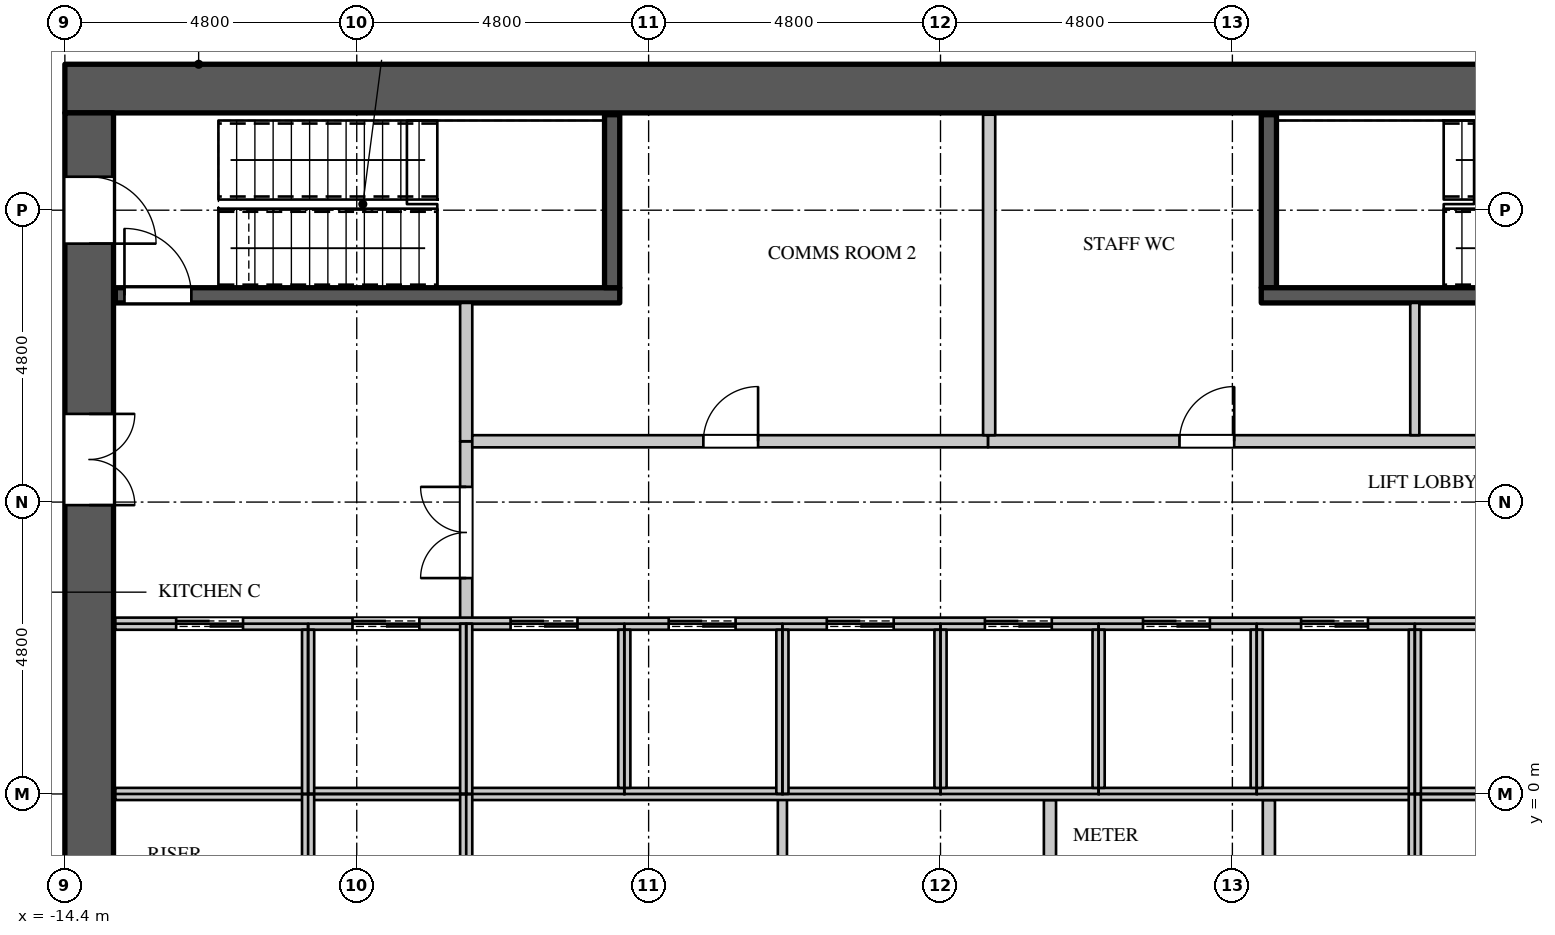
"""IFC4 building model, lengths in metres.
Left out: names, types, materials, properties, quantities, classifications, styles, units other than length and angle.
Written with IfcOpenShell. Run it as: python <this file> out.ifc"""

import sys

from ifc_helpers import new_model, si_unit, direction, frame, frame_2d, origin, place, context, subcontext, project, spatial, rectangle, extrude, element, fill, save


model = new_model("IFC4")
c1 = context("Model", 3, precision=1e-05, world=origin(), true_north=direction((0.0, 1.0)))
c2 = subcontext(c1, "Body", "Model", "MODEL_VIEW")
j1 = project(units=[si_unit("LENGTHUNIT", "METRE"), si_unit("PLANEANGLEUNIT", "RADIAN")], contexts=[c1])
p1 = place(None, origin())
s1 = spatial("IfcSite", under=j1, at=p1, CompositionType="ELEMENT")
p2 = place(p1, origin())
s2 = spatial("IfcBuilding", under=s1, at=p2, CompositionType="ELEMENT")
p3 = place(p2, frame((0.0, 0.0, 148.5)))
s3 = spatial("IfcBuildingStorey", under=s2, at=p3, CompositionType="ELEMENT", Elevation=148.5)
p4 = place(p3, frame((-14.4, 11.6, 0.0), z_axis=(0.0, 0.0, 1.0), x_axis=(1.0, 0.0, 0.0)))
e1 = element("IfcWall", 1, at=p4, inside=s3, PredefinedType="SHEAR", context=c2, shape_type="SweptSolid", body=[
    extrude(rectangle(XDim=28.8, YDim=0.8, at=frame_2d((14.4, 0.0))), origin(), (0.0, 0.0, 1.0), 4.2),
])
p5 = place(p3, frame((-14.0, -11.2, 0.0), z_axis=(0.0, 0.0, 1.0), x_axis=(0.0, 1.0, 0.0)))
e2 = element("IfcWall", 2, at=p5, inside=s3, PredefinedType="SHEAR", context=c2, shape_type="SweptSolid", body=[
    extrude(rectangle(XDim=22.4, YDim=0.8, at=frame_2d((11.2, 0.0))), origin(), (0.0, 0.0, 1.0), 4.2),
])
p6 = place(p5, frame((20.25, 0.0, 0.0)))
e3 = element("IfcOpeningElement", 3, at=p6, cuts=e2, PredefinedType="OPENING", context=c2, shape_type="SweptSolid", body=[
    extrude(rectangle(XDim=1.1, YDim=2.2, at=frame_2d((0.55, 1.1))), frame((0.0, 0.41, 0.0), z_axis=(0.0, -1.0, 0.0), x_axis=(1.0, 0.0, 0.0)), (0.0, 0.0, 1.0), 0.82),
])
p7 = place(p5, frame((1.05, 0.0, 0.0)))
e4 = element("IfcOpeningElement", 4, at=p7, cuts=e2, PredefinedType="OPENING", context=c2, shape_type="SweptSolid", body=[
    extrude(rectangle(XDim=1.1, YDim=2.2, at=frame_2d((0.55, 1.1))), frame((0.0, 0.41, 0.0), z_axis=(0.0, -1.0, 0.0), x_axis=(1.0, 0.0, 0.0)), (0.0, 0.0, 1.0), 0.82),
])
p8 = place(p5, frame((15.95, 0.0, 0.0)))
e5 = element("IfcOpeningElement", 5, at=p8, cuts=e2, PredefinedType="OPENING", context=c2, shape_type="SweptSolid", body=[
    extrude(rectangle(XDim=1.5, YDim=2.4, at=frame_2d((0.75, 1.2))), frame((0.0, 0.41, 0.0), z_axis=(0.0, -1.0, 0.0), x_axis=(1.0, 0.0, 0.0)), (0.0, 0.0, 1.0), 0.82),
])
p9 = place(p5, frame((4.95, 0.0, 0.0)))
e6 = element("IfcOpeningElement", 6, at=p9, cuts=e2, PredefinedType="OPENING", context=c2, shape_type="SweptSolid", body=[
    extrude(rectangle(XDim=1.5, YDim=2.4, at=frame_2d((0.75, 1.2))), frame((0.0, 0.41, 0.0), z_axis=(0.0, -1.0, 0.0), x_axis=(1.0, 0.0, 0.0)), (0.0, 0.0, 1.0), 0.82),
])
p10 = place(p3, frame((-7.8, 2.8, 0.0), z_axis=(0.0, 0.0, 1.0), x_axis=(0.0, 1.0, 0.0)))
e7 = element("IfcWall", 7, at=p10, inside=s3, PredefinedType="PARTITIONING", context=c2, shape_type="SweptSolid", body=[
    extrude(rectangle(XDim=3.0, YDim=0.2, at=frame_2d((1.5, 0.0))), origin(), (0.0, 0.0, 1.0), 3.798),
])
p11 = place(p10, frame((0.75, 0.0, 0.0)))
e8 = element("IfcOpeningElement", 8, at=p11, cuts=e7, PredefinedType="OPENING", context=c2, shape_type="SweptSolid", body=[
    extrude(rectangle(XDim=1.5, YDim=2.4, at=frame_2d((0.75, 1.2))), frame((0.0, 0.11, 0.0), z_axis=(0.0, -1.0, 0.0), x_axis=(1.0, 0.0, 0.0)), (0.0, 0.0, 1.0), 0.22),
])
p12 = place(p3, frame((0.78, 5.8, 0.0), z_axis=(0.0, 0.0, 1.0), x_axis=(1.0, 0.0, 0.0)))
e9 = element("IfcWall", 9, at=p12, inside=s3, PredefinedType="PARTITIONING", context=c2, shape_type="SweptSolid", body=[
    extrude(rectangle(XDim=12.79, YDim=0.2, at=frame_2d((6.395, 0.0))), origin(), (0.0, 0.0, 1.0), 3.798),
])
p13 = place(p12, frame((3.15, 0.0, 0.0)))
e10 = element("IfcOpeningElement", 10, at=p13, cuts=e9, PredefinedType="OPENING", context=c2, shape_type="SweptSolid", body=[
    extrude(rectangle(XDim=0.9, YDim=2.2, at=frame_2d((0.45, 1.1))), frame((0.0, 0.11, 0.0), z_axis=(0.0, -1.0, 0.0), x_axis=(1.0, 0.0, 0.0)), (0.0, 0.0, 1.0), 0.22),
])
p14 = place(p12, frame((9.35, 0.0, 0.0)))
e11 = element("IfcOpeningElement", 11, at=p14, cuts=e9, PredefinedType="OPENING", context=c2, shape_type="SweptSolid", body=[
    extrude(rectangle(XDim=0.9, YDim=2.2, at=frame_2d((0.45, 1.1))), frame((0.0, 0.11, 0.0), z_axis=(0.0, -1.0, 0.0), x_axis=(1.0, 0.0, 0.0)), (0.0, 0.0, 1.0), 0.22),
])
p15 = place(p3, frame((-2.6, -2.7, 0.0), z_axis=(0.0, 0.0, 1.0), x_axis=(0.0, 1.0, 0.0)))
e12 = element("IfcWall", 12, at=p15, inside=s3, PredefinedType="PARTITIONING", context=c2, shape_type="SweptSolid", body=[
    extrude(rectangle(XDim=2.7, YDim=0.15, at=frame_2d((1.35, 0.0))), origin(), (0.0, 0.0, 1.0), 3.798),
])
p16 = place(p3, frame((7.8, 5.9, 0.0), z_axis=(0.0, 0.0, 1.0), x_axis=(0.0, 1.0, 0.0)))
e13 = element("IfcWall", 13, at=p16, inside=s3, PredefinedType="PARTITIONING", context=c2, shape_type="SweptSolid", body=[
    extrude(rectangle(XDim=2.175, YDim=0.15, at=frame_2d((1.087, 0.0))), origin(), (0.0, 0.0, 1.0), 3.798),
])
p17 = place(p3, frame((-7.8, 5.8, 0.0), z_axis=(0.0, 0.0, 1.0), x_axis=(0.0, 1.0, 0.0)))
e14 = element("IfcWall", 14, at=p17, inside=s3, PredefinedType="PARTITIONING", context=c2, shape_type="SweptSolid", body=[
    extrude(rectangle(XDim=2.275, YDim=0.2, at=frame_2d((1.137, 0.0))), origin(), (0.0, 0.0, 1.0), 3.798),
])
p18 = place(p3, frame((-7.7, 5.8, 0.0), z_axis=(0.0, 0.0, 1.0), x_axis=(1.0, 0.0, 0.0)))
e15 = element("IfcWall", 15, at=p18, inside=s3, PredefinedType="PARTITIONING", context=c2, shape_type="SweptSolid", body=[
    extrude(rectangle(XDim=8.48, YDim=0.2, at=frame_2d((4.24, 0.0))), origin(), (0.0, 0.0, 1.0), 3.798),
])
p19 = place(p18, frame((3.8, 0.0, 0.0)))
e16 = element("IfcOpeningElement", 16, at=p19, cuts=e15, PredefinedType="OPENING", context=c2, shape_type="SweptSolid", body=[
    extrude(rectangle(XDim=0.9, YDim=2.2, at=frame_2d((0.45, 1.1))), frame((0.0, 0.11, 0.0), z_axis=(0.0, -1.0, 0.0), x_axis=(1.0, 0.0, 0.0)), (0.0, 0.0, 1.0), 0.22),
])
p20 = place(p3, frame((0.8, 5.9, 0.0), z_axis=(0.0, 0.0, 1.0), x_axis=(0.0, 1.0, 0.0)))
e17 = element("IfcWall", 17, at=p20, inside=s3, PredefinedType="PARTITIONING", context=c2, shape_type="SweptSolid", body=[
    extrude(rectangle(XDim=5.27, YDim=0.2, at=frame_2d((2.635, 0.0))), origin(), (0.0, 0.0, 1.0), 3.798),
])
for number, where, z_axis, x_axis in (
    (18, (1.8, -2.7, 0.0), (0.0, 0.0, 1.0), (0.0, 1.0, 0.0)),
    (19, (5.4, -2.7, 0.0), (0.0, 0.0, 1.0), (0.0, 1.0, 0.0)),
):
    element("IfcWall", number, at=place(p3, frame(where, z_axis=z_axis, x_axis=x_axis)), inside=s3, PredefinedType="PARTITIONING", context=c2, shape_type="SweptSolid", body=[
        extrude(rectangle(XDim=2.6, YDim=0.2, at=frame_2d((1.3, 0.0))), origin(), (0.0, 0.0, 1.0), 3.798),
    ])
p21 = place(p3, frame((-13.57, 0.0, 0.0), z_axis=(0.0, 0.0, 1.0), x_axis=(1.0, 0.0, 0.0)))
e20 = element("IfcWall", 20, at=p21, inside=s3, PredefinedType="PARTITIONING", context=c2, shape_type="SweptSolid", body=[
    extrude(rectangle(XDim=23.97, YDim=0.2, at=frame_2d((11.985, 0.0))), origin(), (0.0, 0.0, 1.0), 3.798),
])
p22 = place(p3, frame((-13.57, 2.8, 0.0), z_axis=(0.0, 0.0, 1.0), x_axis=(1.0, 0.0, 0.0)))
e21 = element("IfcWall", 21, at=p22, inside=s3, PredefinedType="PARTITIONING", context=c2, shape_type="SweptSolid", body=[
    extrude(rectangle(XDim=23.97, YDim=0.2, at=frame_2d((11.985, 0.0))), origin(), (0.0, 0.0, 1.0), 3.798),
])
p23 = place(p22, frame((1.0, 0.0, 0.0)))
e22 = element("IfcOpeningElement", 22, at=p23, cuts=e21, PredefinedType="OPENING", context=c2, shape_type="SweptSolid", body=[
    extrude(rectangle(XDim=1.1, YDim=2.2, at=frame_2d((0.55, 1.1))), frame((0.0, 0.11, 0.0), z_axis=(0.0, -1.0, 0.0), x_axis=(1.0, 0.0, 0.0)), (0.0, 0.0, 1.0), 0.22),
])
p24 = place(p22, frame((3.9, 0.0, 0.0)))
e23 = element("IfcOpeningElement", 23, at=p24, cuts=e21, PredefinedType="OPENING", context=c2, shape_type="SweptSolid", body=[
    extrude(rectangle(XDim=1.1, YDim=2.2, at=frame_2d((0.55, 1.1))), frame((0.0, 0.11, 0.0), z_axis=(0.0, -1.0, 0.0), x_axis=(1.0, 0.0, 0.0)), (0.0, 0.0, 1.0), 0.22),
])
p25 = place(p22, frame((6.5, 0.0, 0.0)))
e24 = element("IfcOpeningElement", 24, at=p25, cuts=e21, PredefinedType="OPENING", context=c2, shape_type="SweptSolid", body=[
    extrude(rectangle(XDim=1.1, YDim=2.2, at=frame_2d((0.55, 1.1))), frame((0.0, 0.11, 0.0), z_axis=(0.0, -1.0, 0.0), x_axis=(1.0, 0.0, 0.0)), (0.0, 0.0, 1.0), 0.22),
])
p26 = place(p22, frame((9.1, 0.0, 0.0)))
e25 = element("IfcOpeningElement", 25, at=p26, cuts=e21, PredefinedType="OPENING", context=c2, shape_type="SweptSolid", body=[
    extrude(rectangle(XDim=1.1, YDim=2.2, at=frame_2d((0.55, 1.1))), frame((0.0, 0.11, 0.0), z_axis=(0.0, -1.0, 0.0), x_axis=(1.0, 0.0, 0.0)), (0.0, 0.0, 1.0), 0.22),
])
p27 = place(p22, frame((11.7, 0.0, 0.0)))
e26 = element("IfcOpeningElement", 26, at=p27, cuts=e21, PredefinedType="OPENING", context=c2, shape_type="SweptSolid", body=[
    extrude(rectangle(XDim=1.1, YDim=2.2, at=frame_2d((0.55, 1.1))), frame((0.0, 0.11, 0.0), z_axis=(0.0, -1.0, 0.0), x_axis=(1.0, 0.0, 0.0)), (0.0, 0.0, 1.0), 0.22),
])
p28 = place(p22, frame((14.3, 0.0, 0.0)))
e27 = element("IfcOpeningElement", 27, at=p28, cuts=e21, PredefinedType="OPENING", context=c2, shape_type="SweptSolid", body=[
    extrude(rectangle(XDim=1.1, YDim=2.2, at=frame_2d((0.55, 1.1))), frame((0.0, 0.11, 0.0), z_axis=(0.0, -1.0, 0.0), x_axis=(1.0, 0.0, 0.0)), (0.0, 0.0, 1.0), 0.22),
])
p29 = place(p22, frame((16.9, 0.0, 0.0)))
e28 = element("IfcOpeningElement", 28, at=p29, cuts=e21, PredefinedType="OPENING", context=c2, shape_type="SweptSolid", body=[
    extrude(rectangle(XDim=1.1, YDim=2.2, at=frame_2d((0.55, 1.1))), frame((0.0, 0.11, 0.0), z_axis=(0.0, -1.0, 0.0), x_axis=(1.0, 0.0, 0.0)), (0.0, 0.0, 1.0), 0.22),
])
p30 = place(p22, frame((19.5, 0.0, 0.0)))
e29 = element("IfcOpeningElement", 29, at=p30, cuts=e21, PredefinedType="OPENING", context=c2, shape_type="SweptSolid", body=[
    extrude(rectangle(XDim=1.1, YDim=2.2, at=frame_2d((0.55, 1.1))), frame((0.0, 0.11, 0.0), z_axis=(0.0, -1.0, 0.0), x_axis=(1.0, 0.0, 0.0)), (0.0, 0.0, 1.0), 0.22),
])
for number, where, z_axis, x_axis in (
    (30, (-10.4, -2.7, 0.0), (0.0, 0.0, 1.0), (0.0, 1.0, 0.0)),
    (31, (-10.4, 0.0, 0.0), (0.0, 0.0, 1.0), (0.0, 1.0, 0.0)),
):
    element("IfcWall", number, at=place(p3, frame(where, z_axis=z_axis, x_axis=x_axis)), inside=s3, PredefinedType="PARTITIONING", context=c2, shape_type="SweptSolid", body=[
        extrude(rectangle(XDim=2.7, YDim=0.2, at=frame_2d((1.35, 0.0))), origin(), (0.0, 0.0, 1.0), 3.798),
    ])
for number, where, z_axis, x_axis in (
    (32, (-7.8, -2.8, 0.0), (0.0, 0.0, 1.0), (0.0, 1.0, 0.0)),
    (33, (-7.8, 0.0, 0.0), (0.0, 0.0, 1.0), (0.0, 1.0, 0.0)),
):
    element("IfcWall", number, at=place(p3, frame(where, z_axis=z_axis, x_axis=x_axis)), inside=s3, PredefinedType="PARTITIONING", context=c2, shape_type="SweptSolid", body=[
        extrude(rectangle(XDim=2.8, YDim=0.2, at=frame_2d((1.4, 0.0))), origin(), (0.0, 0.0, 1.0), 3.798),
    ])
p31 = place(p3, frame((-5.2, 0.1, 0.0), z_axis=(0.0, 0.0, 1.0), x_axis=(0.0, 1.0, 0.0)))
e34 = element("IfcWall", 34, at=p31, inside=s3, PredefinedType="PARTITIONING", context=c2, shape_type="SweptSolid", body=[
    extrude(rectangle(XDim=2.6, YDim=0.2, at=frame_2d((1.3, 0.0))), origin(), (0.0, 0.0, 1.0), 3.798),
])
p32 = place(p3, frame((-2.6, 0.0, 0.0), z_axis=(0.0, 0.0, 1.0), x_axis=(0.0, 1.0, 0.0)))
e35 = element("IfcWall", 35, at=p32, inside=s3, PredefinedType="PARTITIONING", context=c2, shape_type="SweptSolid", body=[
    extrude(rectangle(XDim=2.7, YDim=0.2, at=frame_2d((1.35, 0.0))), origin(), (0.0, 0.0, 1.0), 3.798),
])
for number, where, z_axis, x_axis in (
    (36, (0.0, 0.1, 0.0), (0.0, 0.0, 1.0), (0.0, 1.0, 0.0)),
    (37, (2.6, 0.1, 0.0), (0.0, 0.0, 1.0), (0.0, 1.0, 0.0)),
    (38, (5.2, 0.1, 0.0), (0.0, 0.0, 1.0), (0.0, 1.0, 0.0)),
):
    element("IfcWall", number, at=place(p3, frame(where, z_axis=z_axis, x_axis=x_axis)), inside=s3, PredefinedType="PARTITIONING", context=c2, shape_type="SweptSolid", body=[
        extrude(rectangle(XDim=2.6, YDim=0.2, at=frame_2d((1.3, 0.0))), origin(), (0.0, 0.0, 1.0), 3.798),
    ])
for number, where, z_axis, x_axis in (
    (39, (7.8, -2.7, 0.0), (0.0, 0.0, 1.0), (0.0, 1.0, 0.0)),
    (40, (7.8, 0.0, 0.0), (0.0, 0.0, 1.0), (0.0, 1.0, 0.0)),
):
    element("IfcWall", number, at=place(p3, frame(where, z_axis=z_axis, x_axis=x_axis)), inside=s3, PredefinedType="PARTITIONING", context=c2, shape_type="SweptSolid", body=[
        extrude(rectangle(XDim=2.7, YDim=0.2, at=frame_2d((1.35, 0.0))), origin(), (0.0, 0.0, 1.0), 3.798),
    ])
p33 = place(p3, frame((-13.57, 8.2, 0.0), z_axis=(0.0, 0.0, 1.0), x_axis=(1.0, 0.0, 0.0)))
e41 = element("IfcWall", 41, at=p33, inside=s3, PredefinedType="SHEAR", context=c2, shape_type="SweptSolid", body=[
    extrude(rectangle(XDim=8.295, YDim=0.25, at=frame_2d((4.147, 0.0))), origin(), (0.0, 0.0, 1.0), 3.798),
])
p34 = place(p33, frame((0.15, 0.0, 0.0)))
e42 = element("IfcOpeningElement", 42, at=p34, cuts=e41, PredefinedType="OPENING", context=c2, shape_type="SweptSolid", body=[
    extrude(rectangle(XDim=1.1, YDim=2.2, at=frame_2d((0.55, 1.1))), frame((0.0, 0.135, 0.0), z_axis=(0.0, -1.0, 0.0), x_axis=(1.0, 0.0, 0.0)), (0.0, 0.0, 1.0), 0.27),
])
for number, where, z_axis, x_axis in (
    (43, (-5.4, 8.325, 0.0), (0.0, 0.0, 1.0), (0.0, 1.0, 0.0)),
    (44, (5.4, 8.325, 0.0), (0.0, 0.0, 1.0), (0.0, 1.0, 0.0)),
):
    element("IfcWall", number, at=place(p3, frame(where, z_axis=z_axis, x_axis=x_axis)), inside=s3, PredefinedType="SHEAR", context=c2, shape_type="SweptSolid", body=[
        extrude(rectangle(XDim=2.845, YDim=0.25, at=frame_2d((1.422, 0.0))), origin(), (0.0, 0.0, 1.0), 3.798),
    ])
p35 = place(p3, frame((5.275, 8.2, 0.0), z_axis=(0.0, 0.0, 1.0), x_axis=(1.0, 0.0, 0.0)))
e45 = element("IfcWall", 45, at=p35, inside=s3, PredefinedType="SHEAR", context=c2, shape_type="SweptSolid", body=[
    extrude(rectangle(XDim=8.295, YDim=0.25, at=frame_2d((4.147, 0.0))), origin(), (0.0, 0.0, 1.0), 3.798),
])
p36 = place(p19, origin())
e46 = element("IfcDoor", 46, at=p36, inside=s3, OperationType="SINGLE_SWING_RIGHT", PredefinedType="DOOR", context=c2, shape_type="SweptSolid", body=[
    extrude(rectangle(XDim=0.9, YDim=2.2, at=frame_2d((0.45, 1.1))), frame((0.0, 0.025, 0.0), z_axis=(0.0, -1.0, 0.0), x_axis=(1.0, 0.0, 0.0)), (0.0, 0.0, 1.0), 0.05),
])
fill(e16, e46)
p37 = place(p13, origin())
e47 = element("IfcDoor", 47, at=p37, inside=s3, OperationType="SINGLE_SWING_RIGHT", PredefinedType="DOOR", context=c2, shape_type="SweptSolid", body=[
    extrude(rectangle(XDim=0.9, YDim=2.2, at=frame_2d((0.45, 1.1))), frame((0.0, 0.025, 0.0), z_axis=(0.0, -1.0, 0.0), x_axis=(1.0, 0.0, 0.0)), (0.0, 0.0, 1.0), 0.05),
])
fill(e10, e47)
p38 = place(p23, origin())
e48 = element("IfcDoor", 48, at=p38, inside=s3, OperationType="DOUBLE_DOOR_SLIDING", PredefinedType="DOOR", context=c2, shape_type="SweptSolid", body=[
    extrude(rectangle(XDim=1.1, YDim=2.2, at=frame_2d((0.55, 1.1))), frame((0.0, 0.025, 0.0), z_axis=(0.0, -1.0, 0.0), x_axis=(1.0, 0.0, 0.0)), (0.0, 0.0, 1.0), 0.05),
])
fill(e22, e48)
p39 = place(p24, origin())
e49 = element("IfcDoor", 49, at=p39, inside=s3, OperationType="DOUBLE_DOOR_SLIDING", PredefinedType="DOOR", context=c2, shape_type="SweptSolid", body=[
    extrude(rectangle(XDim=1.1, YDim=2.2, at=frame_2d((0.55, 1.1))), frame((0.0, 0.025, 0.0), z_axis=(0.0, -1.0, 0.0), x_axis=(1.0, 0.0, 0.0)), (0.0, 0.0, 1.0), 0.05),
])
fill(e23, e49)
p40 = place(p25, origin())
e50 = element("IfcDoor", 50, at=p40, inside=s3, OperationType="DOUBLE_DOOR_SLIDING", PredefinedType="DOOR", context=c2, shape_type="SweptSolid", body=[
    extrude(rectangle(XDim=1.1, YDim=2.2, at=frame_2d((0.55, 1.1))), frame((0.0, 0.025, 0.0), z_axis=(0.0, -1.0, 0.0), x_axis=(1.0, 0.0, 0.0)), (0.0, 0.0, 1.0), 0.05),
])
fill(e24, e50)
p41 = place(p26, origin())
e51 = element("IfcDoor", 51, at=p41, inside=s3, OperationType="DOUBLE_DOOR_SLIDING", PredefinedType="DOOR", context=c2, shape_type="SweptSolid", body=[
    extrude(rectangle(XDim=1.1, YDim=2.2, at=frame_2d((0.55, 1.1))), frame((0.0, 0.025, 0.0), z_axis=(0.0, -1.0, 0.0), x_axis=(1.0, 0.0, 0.0)), (0.0, 0.0, 1.0), 0.05),
])
fill(e25, e51)
p42 = place(p27, origin())
e52 = element("IfcDoor", 52, at=p42, inside=s3, OperationType="DOUBLE_DOOR_SLIDING", PredefinedType="DOOR", context=c2, shape_type="SweptSolid", body=[
    extrude(rectangle(XDim=1.1, YDim=2.2, at=frame_2d((0.55, 1.1))), frame((0.0, 0.025, 0.0), z_axis=(0.0, -1.0, 0.0), x_axis=(1.0, 0.0, 0.0)), (0.0, 0.0, 1.0), 0.05),
])
fill(e26, e52)
p43 = place(p28, origin())
e53 = element("IfcDoor", 53, at=p43, inside=s3, OperationType="DOUBLE_DOOR_SLIDING", PredefinedType="DOOR", context=c2, shape_type="SweptSolid", body=[
    extrude(rectangle(XDim=1.1, YDim=2.2, at=frame_2d((0.55, 1.1))), frame((0.0, 0.025, 0.0), z_axis=(0.0, -1.0, 0.0), x_axis=(1.0, 0.0, 0.0)), (0.0, 0.0, 1.0), 0.05),
])
fill(e27, e53)
p44 = place(p29, origin())
e54 = element("IfcDoor", 54, at=p44, inside=s3, OperationType="DOUBLE_DOOR_SLIDING", PredefinedType="DOOR", context=c2, shape_type="SweptSolid", body=[
    extrude(rectangle(XDim=1.1, YDim=2.2, at=frame_2d((0.55, 1.1))), frame((0.0, 0.025, 0.0), z_axis=(0.0, -1.0, 0.0), x_axis=(1.0, 0.0, 0.0)), (0.0, 0.0, 1.0), 0.05),
])
fill(e28, e54)
p45 = place(p30, origin())
e55 = element("IfcDoor", 55, at=p45, inside=s3, OperationType="DOUBLE_DOOR_SLIDING", PredefinedType="DOOR", context=c2, shape_type="SweptSolid", body=[
    extrude(rectangle(XDim=1.1, YDim=2.2, at=frame_2d((0.55, 1.1))), frame((0.0, 0.025, 0.0), z_axis=(0.0, -1.0, 0.0), x_axis=(1.0, 0.0, 0.0)), (0.0, 0.0, 1.0), 0.05),
])
fill(e29, e55)
p46 = place(p34, origin())
e56 = element("IfcDoor", 56, at=p46, inside=s3, OperationType="SINGLE_SWING_LEFT", PredefinedType="DOOR", context=c2, shape_type="SweptSolid", body=[
    extrude(rectangle(XDim=1.1, YDim=2.2, at=frame_2d((0.55, 1.1))), frame((0.0, 0.025, 0.0), z_axis=(0.0, -1.0, 0.0), x_axis=(1.0, 0.0, 0.0)), (0.0, 0.0, 1.0), 0.05),
])
fill(e42, e56)
p47 = place(p11, origin())
e57 = element("IfcDoor", 57, at=p47, inside=s3, OperationType="DOUBLE_DOOR_SINGLE_SWING", PredefinedType="DOOR", context=c2, shape_type="SweptSolid", body=[
    extrude(rectangle(XDim=1.5, YDim=2.4, at=frame_2d((0.75, 1.2))), frame((0.0, 0.025, 0.0), z_axis=(0.0, -1.0, 0.0), x_axis=(1.0, 0.0, 0.0)), (0.0, 0.0, 1.0), 0.05),
])
fill(e8, e57)
p48 = place(p6, origin())
e58 = element("IfcDoor", 58, at=p48, inside=s3, OperationType="SINGLE_SWING_RIGHT", PredefinedType="DOOR", context=c2, shape_type="SweptSolid", body=[
    extrude(rectangle(XDim=1.1, YDim=2.2, at=frame_2d((0.55, 1.1))), frame((0.0, -0.345, 0.0), z_axis=(0.0, -1.0, 0.0), x_axis=(1.0, 0.0, 0.0)), (0.0, 0.0, 1.0), 0.05),
])
fill(e3, e58)
p49 = place(p8, origin())
e59 = element("IfcDoor", 59, at=p49, inside=s3, OperationType="DOUBLE_DOOR_SINGLE_SWING", PredefinedType="DOOR", context=c2, shape_type="SweptSolid", body=[
    extrude(rectangle(XDim=1.5, YDim=2.4, at=frame_2d((0.75, 1.2))), frame((0.0, -0.345, 0.0), z_axis=(0.0, -1.0, 0.0), x_axis=(1.0, 0.0, 0.0)), (0.0, 0.0, 1.0), 0.05),
])
fill(e5, e59)
save(model, sys.argv[1])
